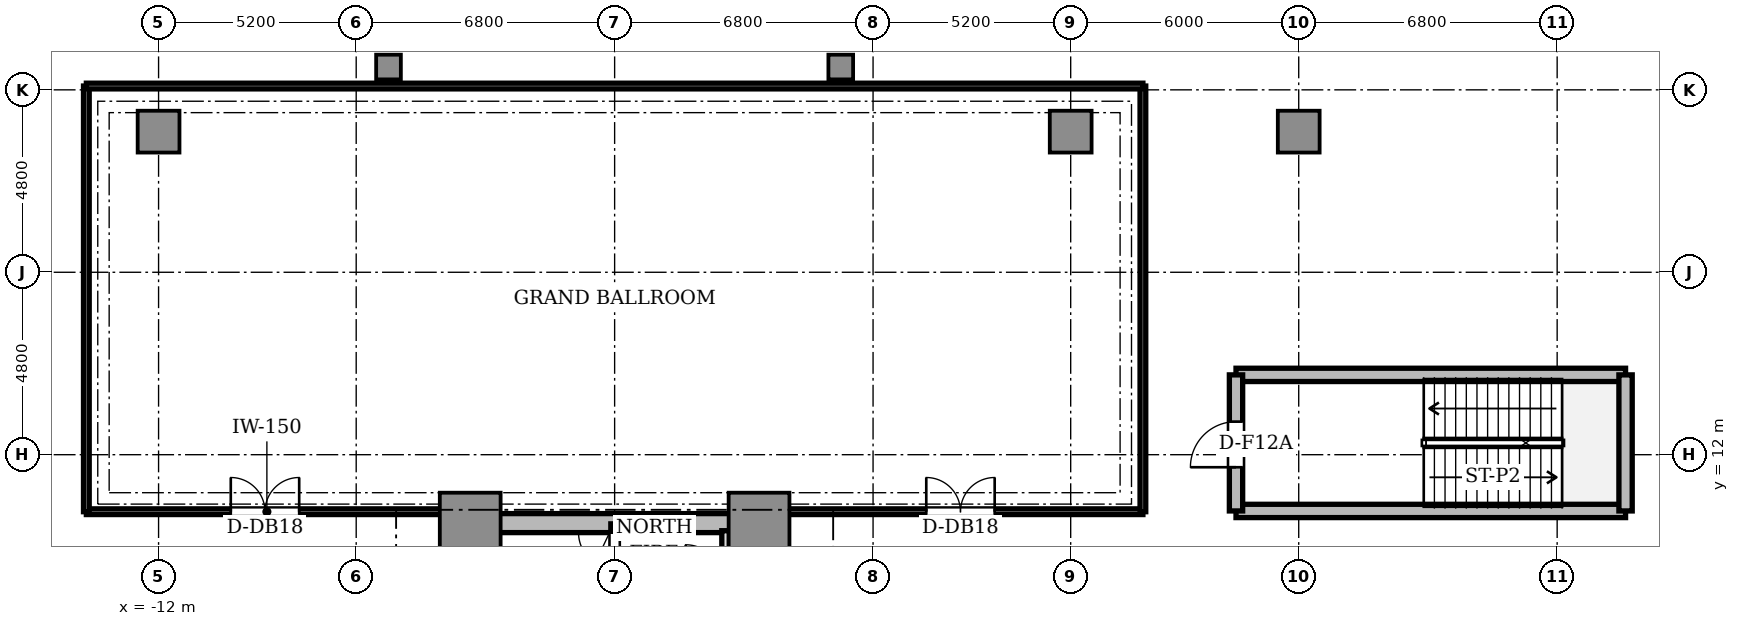
"""IFC4 building model, lengths in metres.
Left out: names, types, materials, properties, quantities, classifications, styles, units other than length and angle.
Written with IfcOpenShell. Run it as: python <this file> out.ifc"""

import sys

from ifc_helpers import new_model, si_unit, direction, frame, frame_2d, origin, origin_2d, place, context, subcontext, project, spatial, rectangle, hollow_rectangle, circle, extrude, source, transform, mapped, element, fill, save


model = new_model("IFC4")
c1 = context("Model", 3, precision=1e-05, world=origin(), true_north=direction((0.0, 1.0)))
c2 = subcontext(c1, "Body", "Model", "MODEL_VIEW")
j1 = project(units=[si_unit("LENGTHUNIT", "METRE"), si_unit("PLANEANGLEUNIT", "RADIAN")], contexts=[c1])
p1 = place(None, origin())
s1 = spatial("IfcSite", under=j1, at=p1, CompositionType="ELEMENT")
p2 = place(p1, origin())
s2 = spatial("IfcBuilding", under=s1, at=p2, CompositionType="ELEMENT")
p3 = place(p2, frame((0.0, 0.0, 9.3)))
s3 = spatial("IfcBuildingStorey", under=s2, at=p3, CompositionType="ELEMENT", Elevation=9.3)
p4 = place(p3, frame((-3.55, 10.2, 0.0), z_axis=(0.0, 0.0, 1.0), x_axis=(1.0, 0.0, 0.0)))
e1 = element("IfcWall", 1, at=p4, inside=s3, PredefinedType="SHEAR", context=c2, shape_type="SweptSolid", body=[
    extrude(rectangle(XDim=7.1, YDim=0.5, at=frame_2d((3.55, 0.0))), origin(), (0.0, 0.0, 1.0), 4.4),
])
p5 = place(p3, frame((-3.8, 2.85, 0.0), z_axis=(0.0, 0.0, 1.0), x_axis=(0.0, 1.0, 0.0)))
e2 = element("IfcWall", 2, at=p5, inside=s3, PredefinedType="SHEAR", context=c2, shape_type="SweptSolid", body=[
    extrude(rectangle(XDim=6.9, YDim=0.5, at=frame_2d((3.45, 0.0))), origin(), (0.0, 0.0, 1.0), 4.4),
])
m1 = source(origin(), c2, "Body", "SweptSolid", [
    extrude(rectangle(XDim=1.6, YDim=1.6, at=origin_2d()), origin(), (0.0, 0.0, 1.0), 4.4),
])
for number, where, z_axis, x_axis in (
    (3, (-3.8, 10.2, 0.0), (0.0, 0.0, 1.0), (1.0, 0.0, 0.0)),
    (4, (3.8, 10.2, 0.0), (0.0, 0.0, 1.0), (1.0, 0.0, 0.0)),
):
    element("IfcColumn", number, at=place(p3, frame(where, z_axis=z_axis, x_axis=x_axis)), inside=s3, PredefinedType="COLUMN", context=c2, shape_type="MappedRepresentation", body=[
        mapped(m1, transform((0.0, 0.0, 0.0), scale=1.0)),
    ])
m2 = source(origin(), c2, "Body", "SweptSolid", [
    extrude(hollow_rectangle(XDim=0.65, YDim=0.65, WallThickness=0.032, at=origin_2d()), origin(), (0.0, 0.0, 1.0), 4.4),
])
for number, where, z_axis, x_axis in (
    (5, (5.95, 22.2, 0.0), (0.0, 0.0, 1.0), (1.0, 0.0, 0.0)),
    (6, (-5.95, 22.2, 0.0), (0.0, 0.0, 1.0), (1.0, 0.0, 0.0)),
):
    element("IfcColumn", number, at=place(p3, frame(where, z_axis=z_axis, x_axis=x_axis)), inside=s3, PredefinedType="COLUMN", context=c2, shape_type="MappedRepresentation", body=[
        mapped(m2, transform((0.0, 0.0, 0.0), scale=1.0)),
    ])
m3 = source(origin(), c2, "Body", "SweptSolid", [
    extrude(circle(Radius=0.55, at=origin_2d()), origin(), (0.0, 0.0, 1.0), 4.4),
])
for number, where, z_axis, x_axis in (
    (7, (-12.0, 20.5, 0.0), (0.0, 0.0, 1.0), (1.0, 0.0, 0.0)),
    (8, (12.0, 20.5, 0.0), (0.0, 0.0, 1.0), (1.0, 0.0, 0.0)),
    (9, (18.0, 20.5, 0.0), (0.0, 0.0, 1.0), (1.0, 0.0, 0.0)),
):
    element("IfcColumn", number, at=place(p3, frame(where, z_axis=z_axis, x_axis=x_axis)), inside=s3, PredefinedType="COLUMN", context=c2, shape_type="MappedRepresentation", body=[
        mapped(m3, transform((0.0, 0.0, 0.0), scale=1.0)),
    ])
p6 = place(p3, frame((0.0, 2.5, 0.0), z_axis=(0.0, 0.0, 1.0), x_axis=(0.0, 1.0, 0.0)))
e10 = element("IfcWall", 10, at=p6, inside=s3, PredefinedType="SOLIDWALL", context=c2, shape_type="SweptSolid", body=[
    extrude(rectangle(XDim=7.68, YDim=0.2, at=frame_2d((3.84, 0.0))), origin(), (0.0, 0.0, 1.0), 4.4),
])
p7 = place(p6, frame((6.5, 0.0, 0.0)))
e11 = element("IfcOpeningElement", 11, at=p7, cuts=e10, PredefinedType="OPENING", context=c2, shape_type="SweptSolid", body=[
    extrude(rectangle(XDim=0.95, YDim=2.15, at=frame_2d((0.475, 1.075))), frame((0.0, 0.11, 0.0), z_axis=(0.0, -1.0, 0.0), x_axis=(1.0, 0.0, 0.0)), (0.0, 0.0, 1.0), 0.22),
])
p8 = place(p3, frame((2.92, 8.68, 0.0), z_axis=(0.0, 0.0, 1.0), x_axis=(0.0, 1.0, 0.0)))
e12 = element("IfcWall", 12, at=p8, inside=s3, PredefinedType="SOLIDWALL", context=c2, shape_type="SweptSolid", body=[
    extrude(rectangle(XDim=1.32, YDim=0.2, at=frame_2d((0.66, 0.0))), origin(), (0.0, 0.0, 1.0), 3.95),
])
for number, where, z_axis, x_axis in (
    (13, (16.35, 14.1, 0.0), (0.0, 0.0, 1.0), (1.0, 0.0, 0.0)),
    (14, (16.35, 10.52, 0.0), (0.0, 0.0, 1.0), (1.0, 0.0, 0.0)),
):
    element("IfcWall", number, at=place(p3, frame(where, z_axis=z_axis, x_axis=x_axis)), inside=s3, PredefinedType="SHEAR", context=c2, shape_type="SweptSolid", body=[
        extrude(rectangle(XDim=10.25, YDim=0.35, at=frame_2d((5.125, 0.0))), origin(), (0.0, 0.0, 1.0), 4.4),
    ])
p9 = place(p3, frame((16.35, 10.52, 0.0), z_axis=(0.0, 0.0, 1.0), x_axis=(0.0, 1.0, 0.0)))
e15 = element("IfcWall", 15, at=p9, inside=s3, PredefinedType="SHEAR", context=c2, shape_type="SweptSolid", body=[
    extrude(rectangle(XDim=3.58, YDim=0.35, at=frame_2d((1.79, 0.0))), origin(), (0.0, 0.0, 1.0), 4.4),
])
p10 = place(p9, frame((1.15, 0.0, 0.0)))
e16 = element("IfcOpeningElement", 16, at=p10, cuts=e15, PredefinedType="OPENING", context=c2, shape_type="SweptSolid", body=[
    extrude(rectangle(XDim=1.2, YDim=2.2, at=frame_2d((0.6, 1.1))), frame((0.0, 0.185, 0.0), z_axis=(0.0, -1.0, 0.0), x_axis=(1.0, 0.0, 0.0)), (0.0, 0.0, 1.0), 0.37),
])
p11 = place(p3, frame((26.6, 10.52, 0.0), z_axis=(0.0, 0.0, 1.0), x_axis=(0.0, 1.0, 0.0)))
e17 = element("IfcWall", 17, at=p11, inside=s3, PredefinedType="SHEAR", context=c2, shape_type="SweptSolid", body=[
    extrude(rectangle(XDim=3.58, YDim=0.35, at=frame_2d((1.79, 0.0))), origin(), (0.0, 0.0, 1.0), 4.4),
])
p12 = place(p3, frame((-13.9, 10.5, 0.0), z_axis=(0.0, 0.0, 1.0), x_axis=(1.0, 0.0, 0.0)))
e18 = element("IfcWall", 18, at=p12, inside=s3, PredefinedType="PARTITIONING", context=c2, shape_type="SweptSolid", body=[
    extrude(rectangle(XDim=9.5, YDim=0.15, at=frame_2d((4.75, 0.0))), origin(), (0.0, 0.0, 1.0), 3.95),
])
p13 = place(p12, frame((3.8, 0.0, 0.0)))
e19 = element("IfcOpeningElement", 19, at=p13, cuts=e18, PredefinedType="OPENING", context=c2, shape_type="SweptSolid", body=[
    extrude(rectangle(XDim=1.8, YDim=2.35, at=frame_2d((0.9, 1.175))), frame((0.0, 0.085, 0.0), z_axis=(0.0, -1.0, 0.0), x_axis=(1.0, 0.0, 0.0)), (0.0, 0.0, 1.0), 0.17),
])
p14 = place(p3, frame((4.4, 10.5, 0.0), z_axis=(0.0, 0.0, 1.0), x_axis=(1.0, 0.0, 0.0)))
e20 = element("IfcWall", 20, at=p14, inside=s3, PredefinedType="PARTITIONING", context=c2, shape_type="SweptSolid", body=[
    extrude(rectangle(XDim=9.5, YDim=0.15, at=frame_2d((4.75, 0.0))), origin(), (0.0, 0.0, 1.0), 3.95),
])
p15 = place(p14, frame((3.8, 0.0, 0.0)))
e21 = element("IfcOpeningElement", 21, at=p15, cuts=e20, PredefinedType="OPENING", context=c2, shape_type="SweptSolid", body=[
    extrude(rectangle(XDim=1.8, YDim=2.35, at=frame_2d((0.9, 1.175))), frame((0.0, 0.085, 0.0), z_axis=(0.0, -1.0, 0.0), x_axis=(1.0, 0.0, 0.0)), (0.0, 0.0, 1.0), 0.17),
])
for number, where, z_axis, x_axis in (
    (22, (-13.9, 10.5, 0.0), (0.0, 0.0, 1.0), (0.0, 1.0, 0.0)),
    (23, (13.9, 10.5, 0.0), (0.0, 0.0, 1.0), (0.0, 1.0, 0.0)),
):
    element("IfcWall", number, at=place(p3, frame(where, z_axis=z_axis, x_axis=x_axis)), inside=s3, PredefinedType="PARTITIONING", context=c2, shape_type="SweptSolid", body=[
        extrude(rectangle(XDim=11.2, YDim=0.15, at=frame_2d((5.6, 0.0))), origin(), (0.0, 0.0, 1.0), 3.95),
    ])
p16 = place(p3, frame((-13.9, 21.7, 0.0), z_axis=(0.0, 0.0, 1.0), x_axis=(1.0, 0.0, 0.0)))
e24 = element("IfcWall", 24, at=p16, inside=s3, PredefinedType="PARTITIONING", context=c2, shape_type="SweptSolid", body=[
    extrude(rectangle(XDim=27.8, YDim=0.15, at=frame_2d((13.9, 0.0))), origin(), (0.0, 0.0, 1.0), 3.82),
])
m4 = source(origin(), c2, "Body", "SweptSolid", [
    extrude(rectangle(XDim=0.95, YDim=0.05, at=origin_2d()), origin(), (0.0, 0.0, 1.0), 2.15),
])
p17 = place(p7, frame((0.475, 0.0, 0.0)))
e25 = element("IfcDoor", 25, at=p17, inside=s3, OperationType="SINGLE_SWING_RIGHT", PredefinedType="DOOR", context=c2, shape_type="MappedRepresentation", body=[
    mapped(m4, transform((0.0, 0.0, 0.0), scale=1.0)),
])
fill(e11, e25)
m5 = source(origin(), c2, "Body", "SweptSolid", [
    extrude(rectangle(XDim=1.2, YDim=0.05, at=origin_2d()), origin(), (0.0, 0.0, 1.0), 2.2),
])
p18 = place(p10, frame((0.6, 0.0, 0.0)))
e26 = element("IfcDoor", 26, at=p18, inside=s3, OperationType="SINGLE_SWING_LEFT", PredefinedType="DOOR", context=c2, shape_type="MappedRepresentation", body=[
    mapped(m5, transform((0.0, 0.0, 0.0), scale=1.0)),
])
fill(e16, e26)
m6 = source(origin(), c2, "Body", "SweptSolid", [
    extrude(rectangle(XDim=1.8, YDim=0.05, at=origin_2d()), origin(), (0.0, 0.0, 1.0), 2.35),
])
p19 = place(p13, frame((0.9, 0.0, 0.0)))
e27 = element("IfcDoor", 27, at=p19, inside=s3, OperationType="DOUBLE_DOOR_SINGLE_SWING", PredefinedType="DOOR", context=c2, shape_type="MappedRepresentation", body=[
    mapped(m6, transform((0.0, 0.0, 0.0), scale=1.0)),
])
fill(e19, e27)
p20 = place(p15, frame((0.9, 0.0, 0.0)))
e28 = element("IfcDoor", 28, at=p20, inside=s3, OperationType="DOUBLE_DOOR_SINGLE_SWING", PredefinedType="DOOR", context=c2, shape_type="MappedRepresentation", body=[
    mapped(m6, transform((0.0, 0.0, 0.0), scale=1.0)),
])
fill(e21, e28)
save(model, sys.argv[1])
